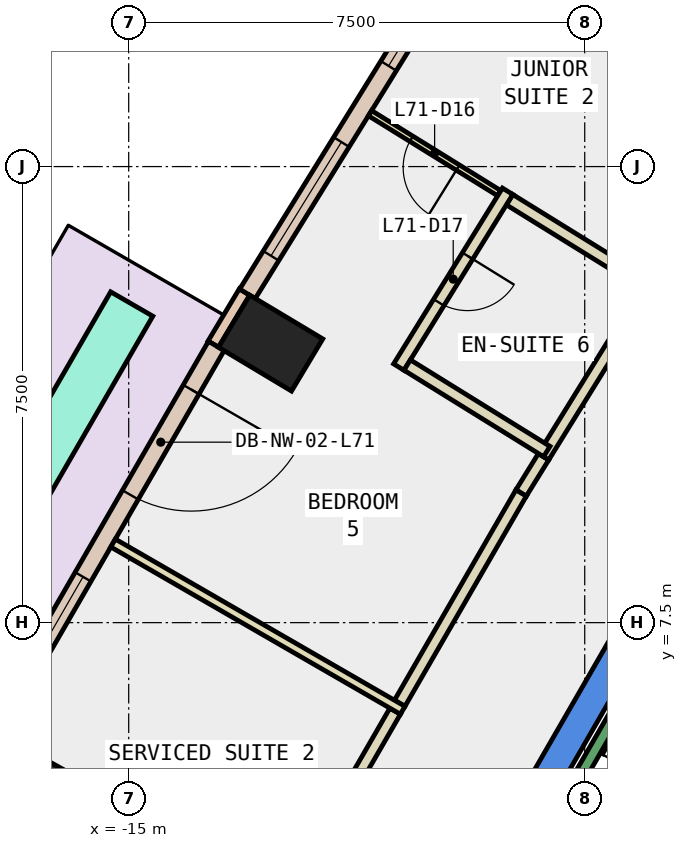
"""IFC4 building model, lengths in metres.
Left out: names, types, materials, properties, quantities, classifications, styles, units other than length and angle.
Written with IfcOpenShell. Run it as: python <this file> out.ifc"""

import sys

from ifc_helpers import new_model, si_unit, direction, frame, frame_2d, origin, origin_2d, place, context, subcontext, project, spatial, polyline, rectangle, outline, extrude, element, fill, save


model = new_model("IFC4")
c1 = context("Model", 3, precision=1e-05, world=origin(), true_north=direction((0.0, 1.0)))
c2 = subcontext(c1, "Body", "Model", "MODEL_VIEW")
j1 = project(units=[si_unit("LENGTHUNIT", "METRE"), si_unit("PLANEANGLEUNIT", "RADIAN")], contexts=[c1])
p1 = place(None, origin())
s1 = spatial("IfcSite", under=j1, at=p1, CompositionType="ELEMENT")
p2 = place(p1, origin())
s2 = spatial("IfcBuilding", under=s1, at=p2, CompositionType="ELEMENT")
p3 = place(p2, frame((0.0, 0.0, 304.4)))
s3 = spatial("IfcBuildingStorey", under=s2, at=p3, CompositionType="ELEMENT", Elevation=304.4)
for number, where, z_axis, x_axis in (
    (1, (-12.666, 12.097, -0.34), (0.0, 0.0, 1.0), (0.514, 0.858, 0.0)),
    (2, (-16.809, 4.921, -0.34), (0.0, 0.0, 1.0), (0.486, 0.874, 0.0)),
):
    element("IfcColumn", number, at=place(p3, frame(where, z_axis=z_axis, x_axis=x_axis)), inside=s3, PredefinedType="COLUMN", context=c2, shape_type="SweptSolid", body=[
        extrude(rectangle(XDim=1.0, YDim=1.4, at=origin_2d()), origin(), (0.0, 0.0, 1.0), 3.6),
    ])
p4 = place(p3, frame((0.0, 0.0, -0.34)))
e3 = element("IfcWall", 3, at=p4, inside=s3, PredefinedType="SHEAR", context=c2, shape_type="SweptSolid", body=[
    extrude(outline(polyline([(-9.236, 3.502), (-8.803, 3.253), (-4.619, 10.5), (-4.907, 11.0), (-9.236, 3.502)])), origin(), (0.0, 0.0, 1.0), 3.6),
])
p5 = place(p3, frame((-13.095, 12.938, 0.0), z_axis=(0.0, 0.0, 1.0), x_axis=(-0.513885310016, -0.857858897576, 0.0)))
e4 = element("IfcWall", 4, at=p5, inside=s3, PredefinedType="STANDARD", context=c2, shape_type="SweptSolid", body=[
    extrude(rectangle(XDim=1.0, YDim=0.2, at=frame_2d((0.5, 0.0))), origin(), (0.0, 0.0, 1.0), 3.26),
])
p6 = place(p3, frame((-9.18, 19.153, 0.0), z_axis=(0.0, 0.0, 1.0), x_axis=(-0.526409529565, -0.850231149267, 0.0)))
e5 = element("IfcWall", 5, at=p6, inside=s3, PredefinedType="STANDARD", context=c2, shape_type="SweptSolid", body=[
    extrude(rectangle(XDim=7.346, YDim=0.3, at=frame_2d((3.673, 0.0))), origin(), (0.0, 0.0, 1.0), 3.26),
])
p7 = place(p6, frame((0.737, 0.0, 0.9)))
e6 = element("IfcOpeningElement", 6, at=p7, cuts=e5, PredefinedType="OPENING", context=c2, shape_type="SweptSolid", body=[
    extrude(rectangle(XDim=2.2, YDim=2.0, at=frame_2d((1.1, 1.0))), frame((0.0, 0.16, 0.0), z_axis=(0.0, -1.0, 0.0), x_axis=(1.0, 0.0, 0.0)), (0.0, 0.0, 1.0), 0.32),
])
p8 = place(p6, frame((4.41, 0.0, 0.9)))
e7 = element("IfcOpeningElement", 7, at=p8, cuts=e5, PredefinedType="OPENING", context=c2, shape_type="SweptSolid", body=[
    extrude(rectangle(XDim=2.2, YDim=2.0, at=frame_2d((1.1, 1.0))), frame((0.0, 0.16, 0.0), z_axis=(0.0, -1.0, 0.0), x_axis=(1.0, 0.0, 0.0)), (0.0, 0.0, 1.0), 0.32),
])
p9 = place(p3, frame((-13.559, 12.051, 0.0), z_axis=(0.0, 0.0, 1.0), x_axis=(-0.499905472729, -0.866079972252, 0.0)))
e8 = element("IfcWall", 8, at=p9, inside=s3, PredefinedType="STANDARD", context=c2, shape_type="SweptSolid", body=[
    extrude(rectangle(XDim=7.313, YDim=0.3, at=frame_2d((3.657, 0.0))), origin(), (0.0, 0.0, 1.0), 3.26),
])
p10 = place(p9, frame((0.828, 0.0, 0.0)))
e9 = element("IfcOpeningElement", 9, at=p10, cuts=e8, PredefinedType="OPENING", context=c2, shape_type="SweptSolid", body=[
    extrude(rectangle(XDim=2.0, YDim=2.4, at=frame_2d((1.0, 1.2))), frame((0.0, 0.16, 0.0), z_axis=(0.0, -1.0, 0.0), x_axis=(1.0, 0.0, 0.0)), (0.0, 0.0, 1.0), 0.32),
])
p11 = place(p9, frame((4.385, 0.0, 0.9)))
e10 = element("IfcOpeningElement", 10, at=p11, cuts=e8, PredefinedType="OPENING", context=c2, shape_type="SweptSolid", body=[
    extrude(rectangle(XDim=2.2, YDim=2.0, at=frame_2d((1.1, 1.0))), frame((0.0, 0.16, 0.0), z_axis=(0.0, -1.0, 0.0), x_axis=(1.0, 0.0, 0.0)), (0.0, 0.0, 1.0), 0.32),
])
p12 = place(p3, frame((-14.95, 12.74, 0.0), z_axis=(0.0, 0.0, 1.0), x_axis=(-0.500043210338, -0.866000454847, 0.0)))
e11 = element("IfcWall", 11, at=p12, inside=s3, PredefinedType="STANDARD", context=c2, shape_type="SweptSolid", body=[
    extrude(rectangle(XDim=7.115, YDim=0.8, at=frame_2d((3.558, 0.0))), origin(), (0.0, 0.0, 1.0), 0.8),
])
p13 = place(p3, frame((-10.543, 6.174, 0.0), z_axis=(0.0, 0.0, 1.0), x_axis=(0.50008212199, 0.86597798544, 0.0)))
e12 = element("IfcWall", 12, at=p13, inside=s3, PredefinedType="PARTITIONING", context=c2, shape_type="SweptSolid", body=[
    extrude(rectangle(XDim=3.995, YDim=0.2, at=frame_2d((1.998, 0.0))), origin(), (0.0, 0.0, 1.0), 3.26),
])
p14 = place(p3, frame((-8.545, 9.634, 0.0), z_axis=(0.0, 0.0, 1.0), x_axis=(0.52594604986, 0.85051793199, 0.0)))
e13 = element("IfcWall", 13, at=p14, inside=s3, PredefinedType="PARTITIONING", context=c2, shape_type="SweptSolid", body=[
    extrude(rectangle(XDim=0.699, YDim=0.2, at=frame_2d((0.35, 0.0))), origin(), (0.0, 0.0, 1.0), 3.26),
])
p15 = place(p3, frame((-8.177, 10.229, 0.0), z_axis=(0.0, 0.0, 1.0), x_axis=(0.526504295939, 0.850172468595, 0.0)))
e14 = element("IfcWall", 14, at=p15, inside=s3, PredefinedType="PARTITIONING", context=c2, shape_type="SweptSolid", body=[
    extrude(rectangle(XDim=3.2, YDim=0.2, at=frame_2d((1.6, 0.0))), origin(), (0.0, 0.0, 1.0), 3.26),
])
p16 = place(p3, frame((-12.616, 2.584, 0.0), z_axis=(0.0, 0.0, 1.0), x_axis=(0.50008212199, 0.86597798544, 0.0)))
e15 = element("IfcWall", 15, at=p16, inside=s3, PredefinedType="PARTITIONING", context=c2, shape_type="SweptSolid", body=[
    extrude(rectangle(XDim=3.995, YDim=0.2, at=frame_2d((1.998, 0.0))), origin(), (0.0, 0.0, 1.0), 3.26),
])
p17 = place(p16, frame((1.498, 0.0, 0.0)))
e16 = element("IfcOpeningElement", 16, at=p17, cuts=e15, PredefinedType="OPENING", context=c2, shape_type="SweptSolid", body=[
    extrude(rectangle(XDim=1.0, YDim=2.1, at=frame_2d((0.5, 1.05))), frame((0.0, 0.11, 0.0), z_axis=(0.0, -1.0, 0.0), x_axis=(1.0, 0.0, 0.0)), (0.0, 0.0, 1.0), 0.22),
])
p18 = place(p3, frame((-4.445, 16.068, 0.0), z_axis=(0.0, 0.0, 1.0), x_axis=(-0.785872006963, 0.618389188677, 0.0)))
e17 = element("IfcWall", 17, at=p18, inside=s3, PredefinedType="PARTITIONING", context=c2, shape_type="SweptSolid", body=[
    extrude(rectangle(XDim=4.216, YDim=0.15, at=frame_2d((2.108, 0.0))), origin(), (0.0, 0.0, 1.0), 3.26),
])
p19 = place(p3, frame((-8.906, 14.562, 0.0), z_axis=(0.0, 0.0, 1.0), x_axis=(-0.850186034224, 0.526482390219, 0.0)))
e18 = element("IfcWall", 18, at=p19, inside=s3, PredefinedType="PARTITIONING", context=c2, shape_type="SweptSolid", body=[
    extrude(rectangle(XDim=2.5, YDim=0.1, at=frame_2d((1.25, 0.0))), origin(), (0.0, 0.0, 1.0), 3.26),
])
p20 = place(p19, frame((0.8, 0.0, 0.0)))
e19 = element("IfcOpeningElement", 19, at=p20, cuts=e18, PredefinedType="OPENING", context=c2, shape_type="SweptSolid", body=[
    extrude(rectangle(XDim=0.9, YDim=2.1, at=frame_2d((0.45, 1.05))), frame((0.0, 0.06, 0.0), z_axis=(0.0, -1.0, 0.0), x_axis=(1.0, 0.0, 0.0)), (0.0, 0.0, 1.0), 0.12),
])
p21 = place(p3, frame((-6.525, 13.088, 0.0), z_axis=(0.0, 0.0, 1.0), x_axis=(-0.850379182329, 0.526170358592, 0.0)))
e20 = element("IfcWall", 20, at=p21, inside=s3, PredefinedType="PARTITIONING", context=c2, shape_type="SweptSolid", body=[
    extrude(rectangle(XDim=2.6, YDim=0.2, at=frame_2d((1.3, 0.0))), origin(), (0.0, 0.0, 1.0), 3.26),
])
p22 = place(p3, frame((-8.768, 14.594, 0.0), z_axis=(0.0, 0.0, 1.0), x_axis=(-0.526418877713, -0.850225361412, 0.0)))
e21 = element("IfcWall", 21, at=p22, inside=s3, PredefinedType="PARTITIONING", context=c2, shape_type="SweptSolid", body=[
    extrude(rectangle(XDim=3.4, YDim=0.2, at=frame_2d((1.7, 0.0))), origin(), (0.0, 0.0, 1.0), 3.26),
])
p23 = place(p22, frame((1.25, 0.0, 0.0)))
e22 = element("IfcOpeningElement", 22, at=p23, cuts=e21, PredefinedType="OPENING", context=c2, shape_type="SweptSolid", body=[
    extrude(rectangle(XDim=0.9, YDim=2.1, at=frame_2d((0.45, 1.05))), frame((0.0, 0.11, 0.0), z_axis=(0.0, -1.0, 0.0), x_axis=(1.0, 0.0, 0.0)), (0.0, 0.0, 1.0), 0.22),
])
p24 = place(p3, frame((-10.42, 11.736, 0.0), z_axis=(0.0, 0.0, 1.0), x_axis=(0.850124477172, -0.52658178217, 0.0)))
e23 = element("IfcWall", 23, at=p24, inside=s3, PredefinedType="PARTITIONING", context=c2, shape_type="SweptSolid", body=[
    extrude(rectangle(XDim=2.701, YDim=0.2, at=frame_2d((1.35, 0.0))), origin(), (0.0, 0.0, 1.0), 3.26),
])
p25 = place(p3, frame((-10.494, 6.059, 0.0), z_axis=(0.0, 0.0, 1.0), x_axis=(-0.866027397988, 0.499996545922, 0.0)))
e24 = element("IfcWall", 24, at=p25, inside=s3, PredefinedType="PARTITIONING", context=c2, shape_type="SweptSolid", body=[
    extrude(rectangle(XDim=5.5, YDim=0.15, at=frame_2d((2.75, 0.0))), origin(), (0.0, 0.0, 1.0), 3.26),
])
p26 = place(p3, frame((-5.03, 9.388, 0.0), z_axis=(0.0, 0.0, 1.0), x_axis=(-0.499978703459, -0.866037698999, 0.0)))
e25 = element("IfcWall", 25, at=p26, inside=s3, PredefinedType="STANDARD", context=c2, shape_type="SweptSolid", body=[
    extrude(rectangle(XDim=6.9, YDim=0.2, at=frame_2d((3.45, 0.0))), origin(), (0.0, 0.0, 1.0), 3.26),
])
p27 = place(p7, origin())
e26 = element("IfcWindow", 26, at=p27, inside=s3, PartitioningType="SINGLE_PANEL", PredefinedType="WINDOW", context=c2, shape_type="SweptSolid", body=[
    extrude(rectangle(XDim=2.2, YDim=2.0, at=frame_2d((1.1, 1.0))), frame((0.0, 0.03, 0.0), z_axis=(0.0, -1.0, 0.0), x_axis=(1.0, 0.0, 0.0)), (0.0, 0.0, 1.0), 0.06),
])
fill(e6, e26)
p28 = place(p8, origin())
e27 = element("IfcWindow", 27, at=p28, inside=s3, PartitioningType="SINGLE_PANEL", PredefinedType="WINDOW", context=c2, shape_type="SweptSolid", body=[
    extrude(rectangle(XDim=2.2, YDim=2.0, at=frame_2d((1.1, 1.0))), frame((0.0, 0.03, 0.0), z_axis=(0.0, -1.0, 0.0), x_axis=(1.0, 0.0, 0.0)), (0.0, 0.0, 1.0), 0.06),
])
fill(e7, e27)
p29 = place(p10, origin())
e28 = element("IfcDoor", 28, at=p29, inside=s3, OperationType="SLIDING_TO_LEFT", PredefinedType="DOOR", context=c2, shape_type="SweptSolid", body=[
    extrude(rectangle(XDim=2.0, YDim=2.4, at=frame_2d((1.0, 1.2))), frame((0.0, 0.025, 0.0), z_axis=(0.0, -1.0, 0.0), x_axis=(1.0, 0.0, 0.0)), (0.0, 0.0, 1.0), 0.05),
])
fill(e9, e28)
p30 = place(p11, origin())
e29 = element("IfcWindow", 29, at=p30, inside=s3, PartitioningType="SINGLE_PANEL", PredefinedType="WINDOW", context=c2, shape_type="SweptSolid", body=[
    extrude(rectangle(XDim=2.2, YDim=2.0, at=frame_2d((1.1, 1.0))), frame((0.0, 0.03, 0.0), z_axis=(0.0, -1.0, 0.0), x_axis=(1.0, 0.0, 0.0)), (0.0, 0.0, 1.0), 0.06),
])
fill(e10, e29)
p31 = place(p20, origin())
e30 = element("IfcDoor", 30, at=p31, inside=s3, OperationType="SINGLE_SWING_LEFT", PredefinedType="DOOR", context=c2, shape_type="SweptSolid", body=[
    extrude(rectangle(XDim=0.9, YDim=2.1, at=frame_2d((0.45, 1.05))), frame((0.0, 0.025, 0.0), z_axis=(0.0, -1.0, 0.0), x_axis=(1.0, 0.0, 0.0)), (0.0, 0.0, 1.0), 0.05),
])
fill(e19, e30)
p32 = place(p23, origin())
e31 = element("IfcDoor", 31, at=p32, inside=s3, OperationType="SINGLE_SWING_LEFT", PredefinedType="DOOR", context=c2, shape_type="SweptSolid", body=[
    extrude(rectangle(XDim=0.9, YDim=2.1, at=frame_2d((0.45, 1.05))), frame((0.0, 0.025, 0.0), z_axis=(0.0, -1.0, 0.0), x_axis=(1.0, 0.0, 0.0)), (0.0, 0.0, 1.0), 0.05),
])
fill(e22, e31)
save(model, sys.argv[1])
